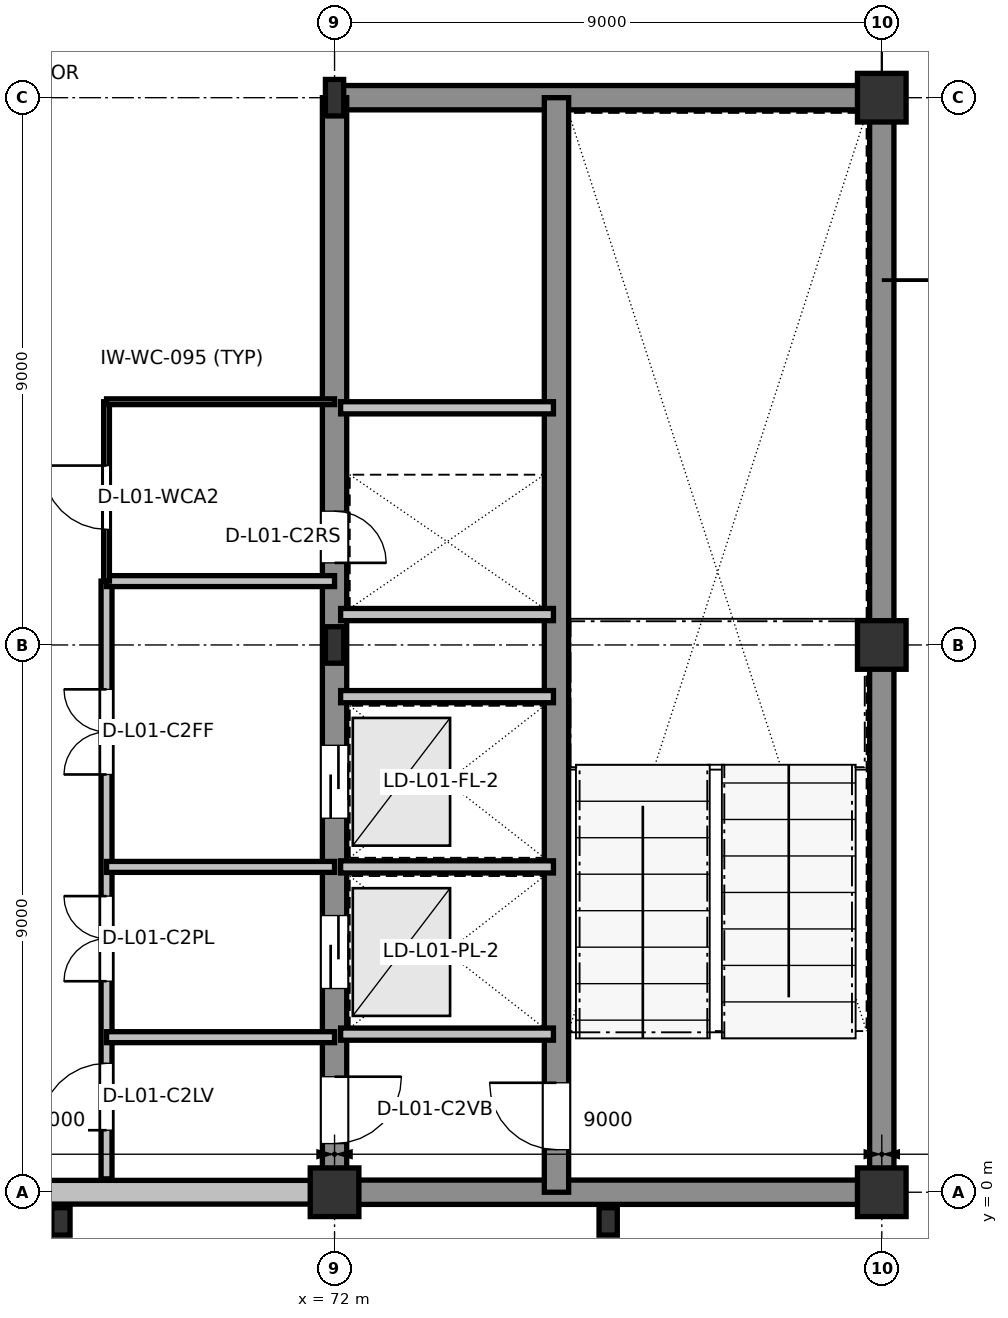
"""IFC4 building model, lengths in metres.
Left out: names, types, materials, properties, quantities, classifications, styles, units other than length and angle.
Written with IfcOpenShell. Run it as: python <this file> out.ifc"""

import sys

from ifc_helpers import new_model, si_unit, direction, frame, frame_2d, origin, origin_2d, place, context, subcontext, project, spatial, rectangle, i_section, extrude, element, fill, save


model = new_model("IFC4")
c1 = context("Model", 3, precision=1e-05, world=origin(), true_north=direction((0.0, 1.0)))
c2 = subcontext(c1, "Body", "Model", "MODEL_VIEW")
j1 = project(units=[si_unit("LENGTHUNIT", "METRE"), si_unit("PLANEANGLEUNIT", "RADIAN")], contexts=[c1])
p1 = place(None, origin())
s1 = spatial("IfcSite", under=j1, at=p1, CompositionType="ELEMENT")
p2 = place(p1, origin())
s2 = spatial("IfcBuilding", under=s1, at=p2, CompositionType="ELEMENT")
p3 = place(p2, frame((0.0, 0.0, 5.4)))
s3 = spatial("IfcBuildingStorey", under=s2, at=p3, CompositionType="ELEMENT", Elevation=5.4)
for number, where, z_axis, x_axis in (
    (1, (67.5, -0.48, 0.0), (0.0, 0.0, 1.0), (1.0, 0.0, 0.0)),
    (2, (76.5, -0.48, 0.0), (0.0, 0.0, 1.0), (1.0, 0.0, 0.0)),
):
    element("IfcColumn", number, at=place(p3, frame(where, z_axis=z_axis, x_axis=x_axis)), inside=s3, PredefinedType="PILASTER", context=c2, shape_type="SweptSolid", body=[
        extrude(rectangle(XDim=0.3, YDim=0.45, at=origin_2d()), origin(), (0.0, 0.0, 1.0), 4.8),
    ])
p4 = place(p3, frame((72.0, 0.0, 0.0), z_axis=(0.0, 0.0, 1.0), x_axis=(1.0, 0.0, 0.0)))
e3 = element("IfcColumn", 3, at=p4, inside=s3, PredefinedType="COLUMN", context=c2, shape_type="SweptSolid", body=[
    extrude(rectangle(XDim=0.8, YDim=0.8, at=origin_2d()), origin(), (0.0, 0.0, 1.0), 4.8),
])
for number, where, z_axis, x_axis in (
    (4, (72.0, 9.0, 0.0), (0.0, 0.0, 1.0), (1.0, 0.0, 0.0)),
    (5, (72.0, 18.0, 0.0), (0.0, 0.0, 1.0), (1.0, 0.0, 0.0)),
):
    element("IfcColumn", number, at=place(p3, frame(where, z_axis=z_axis, x_axis=x_axis)), inside=s3, PredefinedType="COLUMN", context=c2, shape_type="SweptSolid", body=[
        extrude(i_section(OverallWidth=0.3, OverallDepth=0.6, WebThickness=0.015, FlangeThickness=0.03, at=origin_2d()), origin(), (0.0, 0.0, 1.0), 4.8),
    ])
for number, where, z_axis, x_axis in (
    (6, (81.0, 0.0, 0.0), (0.0, 0.0, 1.0), (1.0, 0.0, 0.0)),
    (7, (81.0, 9.0, 0.0), (0.0, 0.0, 1.0), (1.0, 0.0, 0.0)),
    (8, (81.0, 18.0, 0.0), (0.0, 0.0, 1.0), (1.0, 0.0, 0.0)),
):
    element("IfcColumn", number, at=place(p3, frame(where, z_axis=z_axis, x_axis=x_axis)), inside=s3, PredefinedType="COLUMN", context=c2, shape_type="SweptSolid", body=[
        extrude(rectangle(XDim=0.8, YDim=0.8, at=origin_2d()), origin(), (0.0, 0.0, 1.0), 4.8),
    ])
p5 = place(p3, frame((63.385, 0.0, 0.0), z_axis=(0.0, 0.0, 1.0), x_axis=(1.0, 0.0, 0.0)))
e9 = element("IfcWall", 9, at=p5, inside=s3, PredefinedType="STANDARD", context=c2, shape_type="SweptSolid", body=[
    extrude(rectangle(XDim=8.23, YDim=0.39, at=frame_2d((4.115, 0.0))), origin(), (0.0, 0.0, 1.0), 4.195),
])
p6 = place(p5, frame((0.75, 0.0, 0.9)))
e10 = element("IfcOpeningElement", 10, at=p6, cuts=e9, PredefinedType="OPENING", context=c2, shape_type="SweptSolid", body=[
    extrude(rectangle(XDim=1.0, YDim=1.7, at=frame_2d((0.5, 0.85))), frame((0.0, 0.205, 0.0), z_axis=(0.0, -1.0, 0.0), x_axis=(1.0, 0.0, 0.0)), (0.0, 0.0, 1.0), 0.41),
])
p7 = place(p3, frame((72.0, 0.0, 0.0), z_axis=(0.0, 0.0, 1.0), x_axis=(1.0, 0.0, 0.0)))
e11 = element("IfcWall", 11, at=p7, inside=s3, PredefinedType="SHEAR", context=c2, shape_type="SweptSolid", body=[
    extrude(rectangle(XDim=9.0, YDim=0.4, at=frame_2d((4.5, 0.0))), origin(), (0.0, 0.0, 1.0), 4.56),
])
p8 = place(p3, frame((81.0, 0.0, 0.0), z_axis=(0.0, 0.0, 1.0), x_axis=(0.0, 1.0, 0.0)))
e12 = element("IfcWall", 12, at=p8, inside=s3, PredefinedType="SHEAR", context=c2, shape_type="SweptSolid", body=[
    extrude(rectangle(XDim=18.0, YDim=0.4, at=frame_2d((9.0, 0.0))), origin(), (0.0, 0.0, 1.0), 4.56),
])
p9 = place(p3, frame((81.0, 18.0, 0.0), z_axis=(0.0, 0.0, 1.0), x_axis=(-1.0, 0.0, 0.0)))
e13 = element("IfcWall", 13, at=p9, inside=s3, PredefinedType="SHEAR", context=c2, shape_type="SweptSolid", body=[
    extrude(rectangle(XDim=9.0, YDim=0.4, at=frame_2d((4.5, 0.0))), origin(), (0.0, 0.0, 1.0), 4.56),
])
p10 = place(p3, frame((72.0, 18.0, 0.0), z_axis=(0.0, 0.0, 1.0), x_axis=(0.0, -1.0, 0.0)))
e14 = element("IfcWall", 14, at=p10, inside=s3, PredefinedType="SHEAR", context=c2, shape_type="SweptSolid", body=[
    extrude(rectangle(XDim=18.0, YDim=0.4, at=frame_2d((9.0, 0.0))), origin(), (0.0, 0.0, 1.0), 4.56),
])
p11 = place(p10, frame((16.1, 0.0, 0.0)))
e15 = element("IfcOpeningElement", 15, at=p11, cuts=e14, PredefinedType="OPENING", context=c2, shape_type="SweptSolid", body=[
    extrude(rectangle(XDim=1.1, YDim=2.16, at=frame_2d((0.55, 1.08))), frame((0.0, 0.21, 0.0), z_axis=(0.0, -1.0, 0.0), x_axis=(1.0, 0.0, 0.0)), (0.0, 0.0, 1.0), 0.42),
])
p12 = place(p10, frame((13.45, 0.0, 0.0)))
e16 = element("IfcOpeningElement", 16, at=p12, cuts=e14, PredefinedType="OPENING", context=c2, shape_type="SweptSolid", body=[
    extrude(rectangle(XDim=1.2, YDim=2.2, at=frame_2d((0.6, 1.1))), frame((0.0, 0.21, 0.0), z_axis=(0.0, -1.0, 0.0), x_axis=(1.0, 0.0, 0.0)), (0.0, 0.0, 1.0), 0.42),
])
p13 = place(p10, frame((10.65, 0.0, 0.0)))
e17 = element("IfcOpeningElement", 17, at=p13, cuts=e14, PredefinedType="OPENING", context=c2, shape_type="SweptSolid", body=[
    extrude(rectangle(XDim=1.2, YDim=2.2, at=frame_2d((0.6, 1.1))), frame((0.0, 0.21, 0.0), z_axis=(0.0, -1.0, 0.0), x_axis=(1.0, 0.0, 0.0)), (0.0, 0.0, 1.0), 0.42),
])
p14 = place(p10, frame((6.8, 0.0, 0.0)))
e18 = element("IfcOpeningElement", 18, at=p14, cuts=e14, PredefinedType="OPENING", context=c2, shape_type="SweptSolid", body=[
    extrude(rectangle(XDim=0.85, YDim=2.1, at=frame_2d((0.425, 1.05))), frame((0.0, 0.21, 0.0), z_axis=(0.0, -1.0, 0.0), x_axis=(1.0, 0.0, 0.0)), (0.0, 0.0, 1.0), 0.42),
])
p15 = place(p3, frame((75.65, 0.0, 0.0), z_axis=(0.0, 0.0, 1.0), x_axis=(0.0, 1.0, 0.0)))
e19 = element("IfcWall", 19, at=p15, inside=s3, PredefinedType="SHEAR", context=c2, shape_type="SweptSolid", body=[
    extrude(rectangle(XDim=18.0, YDim=0.4, at=frame_2d((9.0, 0.0))), origin(), (0.0, 0.0, 1.0), 4.56),
])
p16 = place(p15, frame((0.7, 0.0, 0.0)))
e20 = element("IfcOpeningElement", 20, at=p16, cuts=e19, PredefinedType="OPENING", context=c2, shape_type="SweptSolid", body=[
    extrude(rectangle(XDim=1.1, YDim=2.16, at=frame_2d((0.55, 1.08))), frame((0.0, 0.21, 0.0), z_axis=(0.0, -1.0, 0.0), x_axis=(1.0, 0.0, 0.0)), (0.0, 0.0, 1.0), 0.42),
])
for number, where, z_axis, x_axis in (
    (21, (72.1, 2.6, 0.0), (0.0, 0.0, 1.0), (1.0, 0.0, 0.0)),
    (22, (72.1, 5.35, 0.0), (0.0, 0.0, 1.0), (1.0, 0.0, 0.0)),
    (23, (72.1, 8.15, 0.0), (0.0, 0.0, 1.0), (1.0, 0.0, 0.0)),
    (24, (72.1, 9.5, 0.0), (0.0, 0.0, 1.0), (1.0, 0.0, 0.0)),
    (25, (72.1, 12.9, 0.0), (0.0, 0.0, 1.0), (1.0, 0.0, 0.0)),
):
    element("IfcWall", number, at=place(p3, frame(where, z_axis=z_axis, x_axis=x_axis)), inside=s3, PredefinedType="PARTITIONING", context=c2, shape_type="SweptSolid", body=[
        extrude(rectangle(XDim=3.5, YDim=0.2, at=frame_2d((1.75, 0.0))), origin(), (0.0, 0.0, 1.0), 4.56),
    ])
p17 = place(p3, frame((68.25, 0.22, 0.0), z_axis=(0.0, 0.0, 1.0), x_axis=(0.0, 1.0, 0.0)))
e26 = element("IfcWall", 26, at=p17, inside=s3, PredefinedType="PARTITIONING", context=c2, shape_type="SweptSolid", body=[
    extrude(rectangle(XDim=9.83, YDim=0.18, at=frame_2d((4.915, 0.0))), origin(), (0.0, 0.0, 1.0), 4.56),
])
p18 = place(p17, frame((0.8, 0.0, 0.0)))
e27 = element("IfcOpeningElement", 27, at=p18, cuts=e26, PredefinedType="OPENING", context=c2, shape_type="SweptSolid", body=[
    extrude(rectangle(XDim=1.1, YDim=2.16, at=frame_2d((0.55, 1.08))), frame((0.0, 0.1, 0.0), z_axis=(0.0, -1.0, 0.0), x_axis=(1.0, 0.0, 0.0)), (0.0, 0.0, 1.0), 0.2),
])
p19 = place(p17, frame((3.25, 0.0, 0.0)))
e28 = element("IfcOpeningElement", 28, at=p19, cuts=e26, PredefinedType="OPENING", context=c2, shape_type="SweptSolid", body=[
    extrude(rectangle(XDim=1.4, YDim=2.2, at=frame_2d((0.7, 1.1))), frame((0.0, 0.1, 0.0), z_axis=(0.0, -1.0, 0.0), x_axis=(1.0, 0.0, 0.0)), (0.0, 0.0, 1.0), 0.2),
])
p20 = place(p17, frame((6.65, 0.0, 0.0)))
e29 = element("IfcOpeningElement", 29, at=p20, cuts=e26, PredefinedType="OPENING", context=c2, shape_type="SweptSolid", body=[
    extrude(rectangle(XDim=1.4, YDim=2.2, at=frame_2d((0.7, 1.1))), frame((0.0, 0.1, 0.0), z_axis=(0.0, -1.0, 0.0), x_axis=(1.0, 0.0, 0.0)), (0.0, 0.0, 1.0), 0.2),
])
for number, where, z_axis, x_axis in (
    (30, (68.25, 2.55, 0.0), (0.0, 0.0, 1.0), (1.0, 0.0, 0.0)),
    (31, (68.25, 5.35, 0.0), (0.0, 0.0, 1.0), (1.0, 0.0, 0.0)),
    (32, (68.25, 10.05, 0.0), (0.0, 0.0, 1.0), (1.0, 0.0, 0.0)),
):
    element("IfcWall", number, at=place(p3, frame(where, z_axis=z_axis, x_axis=x_axis)), inside=s3, PredefinedType="PARTITIONING", context=c2, shape_type="SweptSolid", body=[
        extrude(rectangle(XDim=3.75, YDim=0.18, at=frame_2d((1.875, 0.0))), origin(), (0.0, 0.0, 1.0), 4.56),
    ])
p21 = place(p3, frame((68.25, 10.05, 0.0), z_axis=(0.0, 0.0, 1.0), x_axis=(0.0, 1.0, 0.0)))
e33 = element("IfcWall", 33, at=p21, inside=s3, PredefinedType="PARTITIONING", context=c2, shape_type="SweptSolid", body=[
    extrude(rectangle(XDim=2.95, YDim=0.095, at=frame_2d((1.475, 0.0))), origin(), (0.0, 0.0, 1.0), 4.56),
])
p22 = place(p21, frame((0.85, 0.0, 0.0)))
e34 = element("IfcOpeningElement", 34, at=p22, cuts=e33, PredefinedType="OPENING", context=c2, shape_type="SweptSolid", body=[
    extrude(rectangle(XDim=1.05, YDim=2.13, at=frame_2d((0.525, 1.065))), frame((0.0, 0.057, 0.0), z_axis=(0.0, -1.0, 0.0), x_axis=(1.0, 0.0, 0.0)), (0.0, 0.0, 1.0), 0.115),
])
p23 = place(p3, frame((68.25, 13.0, 0.0), z_axis=(0.0, 0.0, 1.0), x_axis=(1.0, 0.0, 0.0)))
e35 = element("IfcWall", 35, at=p23, inside=s3, PredefinedType="PARTITIONING", context=c2, shape_type="SweptSolid", body=[
    extrude(rectangle(XDim=3.75, YDim=0.095, at=frame_2d((1.875, 0.0))), origin(), (0.0, 0.0, 1.0), 4.56),
])
p24 = place(p16, origin())
e36 = element("IfcDoor", 36, at=p24, inside=s3, OperationType="SINGLE_SWING_RIGHT", PredefinedType="DOOR", context=c2, shape_type="SweptSolid", body=[
    extrude(rectangle(XDim=1.1, YDim=2.16, at=frame_2d((0.55, 1.08))), frame((0.0, 0.025, 0.0), z_axis=(0.0, -1.0, 0.0), x_axis=(1.0, 0.0, 0.0)), (0.0, 0.0, 1.0), 0.05),
])
fill(e20, e36)
p25 = place(p11, origin())
e37 = element("IfcDoor", 37, at=p25, inside=s3, OperationType="SINGLE_SWING_LEFT", PredefinedType="DOOR", context=c2, shape_type="SweptSolid", body=[
    extrude(rectangle(XDim=1.1, YDim=2.16, at=frame_2d((0.55, 1.08))), frame((0.0, 0.025, 0.0), z_axis=(0.0, -1.0, 0.0), x_axis=(1.0, 0.0, 0.0)), (0.0, 0.0, 1.0), 0.05),
])
fill(e15, e37)
p26 = place(p12, origin())
e38 = element("IfcDoor", 38, at=p26, inside=s3, OperationType="SLIDING_TO_LEFT", PredefinedType="DOOR", context=c2, shape_type="SweptSolid", body=[
    extrude(rectangle(XDim=1.2, YDim=2.2, at=frame_2d((0.6, 1.1))), frame((0.0, 0.025, 0.0), z_axis=(0.0, -1.0, 0.0), x_axis=(1.0, 0.0, 0.0)), (0.0, 0.0, 1.0), 0.05),
])
fill(e16, e38)
p27 = place(p13, origin())
e39 = element("IfcDoor", 39, at=p27, inside=s3, OperationType="SLIDING_TO_LEFT", PredefinedType="DOOR", context=c2, shape_type="SweptSolid", body=[
    extrude(rectangle(XDim=1.2, YDim=2.2, at=frame_2d((0.6, 1.1))), frame((0.0, 0.025, 0.0), z_axis=(0.0, -1.0, 0.0), x_axis=(1.0, 0.0, 0.0)), (0.0, 0.0, 1.0), 0.05),
])
fill(e17, e39)
p28 = place(p14, origin())
e40 = element("IfcDoor", 40, at=p28, inside=s3, OperationType="SINGLE_SWING_RIGHT", PredefinedType="DOOR", context=c2, shape_type="SweptSolid", body=[
    extrude(rectangle(XDim=0.85, YDim=2.1, at=frame_2d((0.425, 1.05))), frame((0.0, 0.025, 0.0), z_axis=(0.0, -1.0, 0.0), x_axis=(1.0, 0.0, 0.0)), (0.0, 0.0, 1.0), 0.05),
])
fill(e18, e40)
p29 = place(p18, origin())
e41 = element("IfcDoor", 41, at=p29, inside=s3, OperationType="SINGLE_SWING_LEFT", PredefinedType="DOOR", context=c2, shape_type="SweptSolid", body=[
    extrude(rectangle(XDim=1.1, YDim=2.16, at=frame_2d((0.55, 1.08))), frame((0.0, 0.025, 0.0), z_axis=(0.0, -1.0, 0.0), x_axis=(1.0, 0.0, 0.0)), (0.0, 0.0, 1.0), 0.05),
])
fill(e27, e41)
p30 = place(p19, origin())
e42 = element("IfcDoor", 42, at=p30, inside=s3, OperationType="DOUBLE_DOOR_SINGLE_SWING", PredefinedType="DOOR", context=c2, shape_type="SweptSolid", body=[
    extrude(rectangle(XDim=1.4, YDim=2.2, at=frame_2d((0.7, 1.1))), frame((0.0, 0.025, 0.0), z_axis=(0.0, -1.0, 0.0), x_axis=(1.0, 0.0, 0.0)), (0.0, 0.0, 1.0), 0.05),
])
fill(e28, e42)
p31 = place(p20, origin())
e43 = element("IfcDoor", 43, at=p31, inside=s3, OperationType="DOUBLE_DOOR_SINGLE_SWING", PredefinedType="DOOR", context=c2, shape_type="SweptSolid", body=[
    extrude(rectangle(XDim=1.4, YDim=2.2, at=frame_2d((0.7, 1.1))), frame((0.0, 0.025, 0.0), z_axis=(0.0, -1.0, 0.0), x_axis=(1.0, 0.0, 0.0)), (0.0, 0.0, 1.0), 0.05),
])
fill(e29, e43)
p32 = place(p22, origin())
e44 = element("IfcDoor", 44, at=p32, inside=s3, OperationType="SINGLE_SWING_RIGHT", PredefinedType="DOOR", context=c2, shape_type="SweptSolid", body=[
    extrude(rectangle(XDim=1.05, YDim=2.13, at=frame_2d((0.525, 1.065))), frame((0.0, 0.025, 0.0), z_axis=(0.0, -1.0, 0.0), x_axis=(1.0, 0.0, 0.0)), (0.0, 0.0, 1.0), 0.05),
])
fill(e34, e44)
save(model, sys.argv[1])
